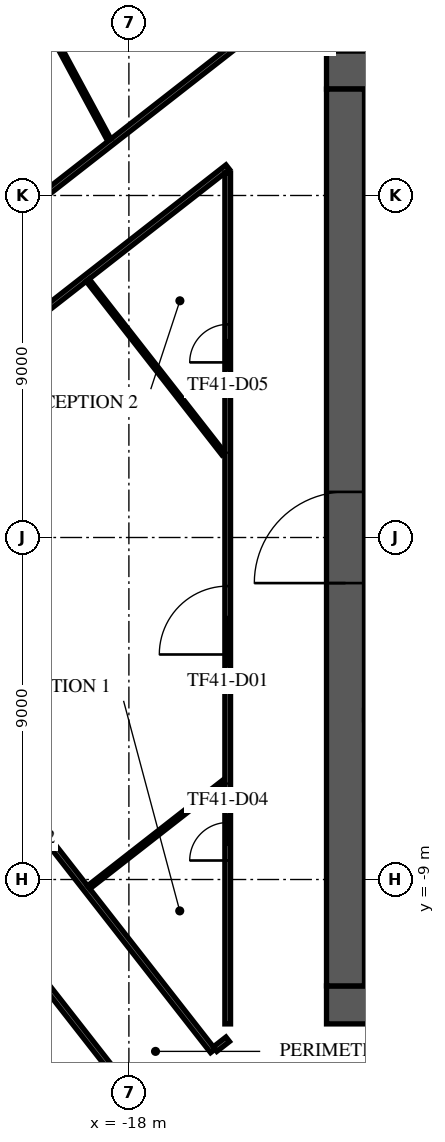
"""IFC4 building model, lengths in metres.
Left out: names, types, materials, properties, quantities, classifications, styles, units other than length and angle.
Written with IfcOpenShell. Run it as: python <this file> out.ifc"""

import sys

from ifc_helpers import new_model, si_unit, direction, frame, frame_2d, origin, place, context, subcontext, project, spatial, rectangle, extrude, element, fill, save


model = new_model("IFC4")
c1 = context("Model", 3, precision=1e-05, world=origin(), true_north=direction((0.0, 1.0)))
c2 = subcontext(c1, "Body", "Model", "MODEL_VIEW")
j1 = project(units=[si_unit("LENGTHUNIT", "METRE"), si_unit("PLANEANGLEUNIT", "RADIAN")], contexts=[c1])
p1 = place(None, origin())
s1 = spatial("IfcSite", under=j1, at=p1, CompositionType="ELEMENT")
p2 = place(p1, origin())
s2 = spatial("IfcBuilding", under=s1, at=p2, CompositionType="ELEMENT")
p3 = place(p2, frame((0.0, 0.0, 175.7)))
s3 = spatial("IfcBuildingStorey", under=s2, at=p3, CompositionType="ELEMENT", Elevation=175.7)
p4 = place(p3, frame((-12.8, 12.3, 0.0), z_axis=(0.0, 0.0, 1.0), x_axis=(1.0, 0.0, 0.0)))
e1 = element("IfcWall", 1, at=p4, inside=s3, PredefinedType="SHEAR", context=c2, shape_type="SweptSolid", body=[
    extrude(rectangle(XDim=25.6, YDim=1.0, at=frame_2d((12.8, 0.0))), origin(), (0.0, 0.0, 1.0), 3.6),
])
p5 = place(p4, frame((11.6, 0.0, 0.0)))
e2 = element("IfcOpeningElement", 2, at=p5, cuts=e1, PredefinedType="OPENING", context=c2, shape_type="SweptSolid", body=[
    extrude(rectangle(XDim=2.4, YDim=2.4, at=frame_2d((1.2, 1.2))), frame((0.0, 0.51, 0.0), z_axis=(0.0, -1.0, 0.0), x_axis=(1.0, 0.0, 0.0)), (0.0, 0.0, 1.0), 1.02),
])
p6 = place(p4, frame((22.425, 0.0, 0.0)))
e3 = element("IfcOpeningElement", 3, at=p6, cuts=e1, PredefinedType="OPENING", context=c2, shape_type="SweptSolid", body=[
    extrude(rectangle(XDim=1.2, YDim=2.1, at=frame_2d((0.6, 1.05))), frame((0.0, 0.51, 0.0), z_axis=(0.0, -1.0, 0.0), x_axis=(1.0, 0.0, 0.0)), (0.0, 0.0, 1.0), 1.02),
])
p7 = place(p4, frame((1.4, 0.0, 0.0)))
e4 = element("IfcOpeningElement", 4, at=p7, cuts=e1, PredefinedType="OPENING", context=c2, shape_type="SweptSolid", body=[
    extrude(rectangle(XDim=1.0, YDim=2.1, at=frame_2d((0.5, 1.05))), frame((0.0, 0.51, 0.0), z_axis=(0.0, -1.0, 0.0), x_axis=(1.0, 0.0, 0.0)), (0.0, 0.0, 1.0), 1.02),
])
p8 = place(p3, frame((-12.8, -12.3, 0.0), z_axis=(0.0, 0.0, 1.0), x_axis=(1.0, 0.0, 0.0)))
e5 = element("IfcWall", 5, at=p8, inside=s3, PredefinedType="SHEAR", context=c2, shape_type="SweptSolid", body=[
    extrude(rectangle(XDim=25.6, YDim=1.0, at=frame_2d((12.8, 0.0))), origin(), (0.0, 0.0, 1.0), 3.6),
])
p9 = place(p8, frame((7.7, 0.0, 0.0)))
e6 = element("IfcOpeningElement", 6, at=p9, cuts=e5, PredefinedType="OPENING", context=c2, shape_type="SweptSolid", body=[
    extrude(rectangle(XDim=2.0, YDim=2.1, at=frame_2d((1.0, 1.05))), frame((0.0, 0.51, 0.0), z_axis=(0.0, -1.0, 0.0), x_axis=(1.0, 0.0, 0.0)), (0.0, 0.0, 1.0), 1.02),
])
p10 = place(p8, frame((17.825, 0.0, 0.0)))
e7 = element("IfcOpeningElement", 7, at=p10, cuts=e5, PredefinedType="OPENING", context=c2, shape_type="SweptSolid", body=[
    extrude(rectangle(XDim=1.2, YDim=2.1, at=frame_2d((0.6, 1.05))), frame((0.0, 0.51, 0.0), z_axis=(0.0, -1.0, 0.0), x_axis=(1.0, 0.0, 0.0)), (0.0, 0.0, 1.0), 1.02),
])
p11 = place(p8, frame((1.975, 0.0, 0.0)))
e8 = element("IfcOpeningElement", 8, at=p11, cuts=e5, PredefinedType="OPENING", context=c2, shape_type="SweptSolid", body=[
    extrude(rectangle(XDim=1.2, YDim=2.1, at=frame_2d((0.6, 1.05))), frame((0.0, 0.51, 0.0), z_axis=(0.0, -1.0, 0.0), x_axis=(1.0, 0.0, 0.0)), (0.0, 0.0, 1.0), 1.02),
])
p12 = place(p8, frame((22.425, 0.0, 0.0)))
e9 = element("IfcOpeningElement", 9, at=p12, cuts=e5, PredefinedType="OPENING", context=c2, shape_type="SweptSolid", body=[
    extrude(rectangle(XDim=1.2, YDim=2.1, at=frame_2d((0.6, 1.05))), frame((0.0, 0.51, 0.0), z_axis=(0.0, -1.0, 0.0), x_axis=(1.0, 0.0, 0.0)), (0.0, 0.0, 1.0), 1.02),
])
p13 = place(p3, frame((-12.3, -11.8, 0.0), z_axis=(0.0, 0.0, 1.0), x_axis=(0.0, 1.0, 0.0)))
e10 = element("IfcWall", 10, at=p13, inside=s3, PredefinedType="SHEAR", context=c2, shape_type="SweptSolid", body=[
    extrude(rectangle(XDim=23.6, YDim=1.0, at=frame_2d((11.8, 0.0))), origin(), (0.0, 0.0, 1.0), 3.6),
])
p14 = place(p13, frame((10.6, 0.0, 0.0)))
e11 = element("IfcOpeningElement", 11, at=p14, cuts=e10, PredefinedType="OPENING", context=c2, shape_type="SweptSolid", body=[
    extrude(rectangle(XDim=2.4, YDim=2.4, at=frame_2d((1.2, 1.2))), frame((0.0, 0.51, 0.0), z_axis=(0.0, -1.0, 0.0), x_axis=(1.0, 0.0, 0.0)), (0.0, 0.0, 1.0), 1.02),
])
p15 = place(p3, frame((-8.65, -4.675, 0.0), z_axis=(0.0, 0.0, 1.0), x_axis=(-1.0, 0.0, 0.0)))
e12 = element("IfcWall", 12, at=p15, inside=s3, PredefinedType="SOLIDWALL", context=c2, shape_type="SweptSolid", body=[
    extrude(rectangle(XDim=3.15, YDim=0.25, at=frame_2d((1.575, 0.0))), origin(), (0.0, 0.0, 1.0), 3.6),
])
p16 = place(p3, frame((3.238, 35.651, 0.0), z_axis=(0.0, 0.0, 1.0), x_axis=(-0.788009530914, -0.615663040298, 0.0)))
e13 = element("IfcWall", 13, at=p16, inside=s3, PredefinedType="STANDARD", context=c2, shape_type="SweptSolid", body=[
    extrude(rectangle(XDim=49.376, YDim=0.6, at=frame_2d((24.688, 0.0))), origin(), (0.0, 0.0, 1.0), 3.6),
])
p17 = place(p16, frame((1.2, 0.0, 0.9)))
e14 = element("IfcOpeningElement", 14, at=p17, cuts=e13, PredefinedType="OPENING", context=c2, shape_type="SweptSolid", body=[
    extrude(rectangle(XDim=2.1, YDim=2.1, at=frame_2d((1.05, 1.05))), frame((0.0, 0.31, 0.0), z_axis=(0.0, -1.0, 0.0), x_axis=(1.0, 0.0, 0.0)), (0.0, 0.0, 1.0), 0.62),
])
p18 = place(p16, frame((5.7, 0.0, 0.9)))
e15 = element("IfcOpeningElement", 15, at=p18, cuts=e13, PredefinedType="OPENING", context=c2, shape_type="SweptSolid", body=[
    extrude(rectangle(XDim=2.1, YDim=2.1, at=frame_2d((1.05, 1.05))), frame((0.0, 0.31, 0.0), z_axis=(0.0, -1.0, 0.0), x_axis=(1.0, 0.0, 0.0)), (0.0, 0.0, 1.0), 0.62),
])
p19 = place(p16, frame((10.2, 0.0, 0.9)))
e16 = element("IfcOpeningElement", 16, at=p19, cuts=e13, PredefinedType="OPENING", context=c2, shape_type="SweptSolid", body=[
    extrude(rectangle(XDim=2.1, YDim=2.1, at=frame_2d((1.05, 1.05))), frame((0.0, 0.31, 0.0), z_axis=(0.0, -1.0, 0.0), x_axis=(1.0, 0.0, 0.0)), (0.0, 0.0, 1.0), 0.62),
])
p20 = place(p16, frame((14.7, 0.0, 0.9)))
e17 = element("IfcOpeningElement", 17, at=p20, cuts=e13, PredefinedType="OPENING", context=c2, shape_type="SweptSolid", body=[
    extrude(rectangle(XDim=2.1, YDim=2.1, at=frame_2d((1.05, 1.05))), frame((0.0, 0.31, 0.0), z_axis=(0.0, -1.0, 0.0), x_axis=(1.0, 0.0, 0.0)), (0.0, 0.0, 1.0), 0.62),
])
p21 = place(p16, frame((19.2, 0.0, 0.9)))
e18 = element("IfcOpeningElement", 18, at=p21, cuts=e13, PredefinedType="OPENING", context=c2, shape_type="SweptSolid", body=[
    extrude(rectangle(XDim=2.1, YDim=2.1, at=frame_2d((1.05, 1.05))), frame((0.0, 0.31, 0.0), z_axis=(0.0, -1.0, 0.0), x_axis=(1.0, 0.0, 0.0)), (0.0, 0.0, 1.0), 0.62),
])
p22 = place(p16, frame((23.7, 0.0, 0.9)))
e19 = element("IfcOpeningElement", 19, at=p22, cuts=e13, PredefinedType="OPENING", context=c2, shape_type="SweptSolid", body=[
    extrude(rectangle(XDim=2.1, YDim=2.1, at=frame_2d((1.05, 1.05))), frame((0.0, 0.31, 0.0), z_axis=(0.0, -1.0, 0.0), x_axis=(1.0, 0.0, 0.0)), (0.0, 0.0, 1.0), 0.62),
])
p23 = place(p16, frame((28.2, 0.0, 0.9)))
e20 = element("IfcOpeningElement", 20, at=p23, cuts=e13, PredefinedType="OPENING", context=c2, shape_type="SweptSolid", body=[
    extrude(rectangle(XDim=2.1, YDim=2.1, at=frame_2d((1.05, 1.05))), frame((0.0, 0.31, 0.0), z_axis=(0.0, -1.0, 0.0), x_axis=(1.0, 0.0, 0.0)), (0.0, 0.0, 1.0), 0.62),
])
p24 = place(p16, frame((32.7, 0.0, 0.9)))
e21 = element("IfcOpeningElement", 21, at=p24, cuts=e13, PredefinedType="OPENING", context=c2, shape_type="SweptSolid", body=[
    extrude(rectangle(XDim=2.1, YDim=2.1, at=frame_2d((1.05, 1.05))), frame((0.0, 0.31, 0.0), z_axis=(0.0, -1.0, 0.0), x_axis=(1.0, 0.0, 0.0)), (0.0, 0.0, 1.0), 0.62),
])
p25 = place(p16, frame((37.2, 0.0, 0.9)))
e22 = element("IfcOpeningElement", 22, at=p25, cuts=e13, PredefinedType="OPENING", context=c2, shape_type="SweptSolid", body=[
    extrude(rectangle(XDim=2.1, YDim=2.1, at=frame_2d((1.05, 1.05))), frame((0.0, 0.31, 0.0), z_axis=(0.0, -1.0, 0.0), x_axis=(1.0, 0.0, 0.0)), (0.0, 0.0, 1.0), 0.62),
])
p26 = place(p16, frame((41.7, 0.0, 0.9)))
e23 = element("IfcOpeningElement", 23, at=p26, cuts=e13, PredefinedType="OPENING", context=c2, shape_type="SweptSolid", body=[
    extrude(rectangle(XDim=2.1, YDim=2.1, at=frame_2d((1.05, 1.05))), frame((0.0, 0.31, 0.0), z_axis=(0.0, -1.0, 0.0), x_axis=(1.0, 0.0, 0.0)), (0.0, 0.0, 1.0), 0.62),
])
p27 = place(p16, frame((46.138, 0.0, 0.9)))
e24 = element("IfcOpeningElement", 24, at=p27, cuts=e13, PredefinedType="OPENING", context=c2, shape_type="SweptSolid", body=[
    extrude(rectangle(XDim=2.1, YDim=2.1, at=frame_2d((1.05, 1.05))), frame((0.0, 0.31, 0.0), z_axis=(0.0, -1.0, 0.0), x_axis=(1.0, 0.0, 0.0)), (0.0, 0.0, 1.0), 0.62),
])
p28 = place(p3, frame((-36.503, -1.52, 0.0), z_axis=(0.0, 0.0, 1.0), x_axis=(0.615658293455, -0.788013239546, 0.0)))
e25 = element("IfcWall", 25, at=p28, inside=s3, PredefinedType="STANDARD", context=c2, shape_type="SweptSolid", body=[
    extrude(rectangle(XDim=42.552, YDim=0.6, at=frame_2d((21.276, 0.0))), origin(), (0.0, 0.0, 1.0), 3.6),
])
p29 = place(p28, frame((1.178, 0.0, 0.9)))
e26 = element("IfcOpeningElement", 26, at=p29, cuts=e25, PredefinedType="OPENING", context=c2, shape_type="SweptSolid", body=[
    extrude(rectangle(XDim=1.8, YDim=2.1, at=frame_2d((0.9, 1.05))), frame((0.0, 0.31, 0.0), z_axis=(0.0, -1.0, 0.0), x_axis=(1.0, 0.0, 0.0)), (0.0, 0.0, 1.0), 0.62),
])
p30 = place(p28, frame((5.396, 0.0, 0.9)))
e27 = element("IfcOpeningElement", 27, at=p30, cuts=e25, PredefinedType="OPENING", context=c2, shape_type="SweptSolid", body=[
    extrude(rectangle(XDim=1.8, YDim=2.1, at=frame_2d((0.9, 1.05))), frame((0.0, 0.31, 0.0), z_axis=(0.0, -1.0, 0.0), x_axis=(1.0, 0.0, 0.0)), (0.0, 0.0, 1.0), 0.62),
])
p31 = place(p28, frame((9.676, 0.0, 0.9)))
e28 = element("IfcOpeningElement", 28, at=p31, cuts=e25, PredefinedType="OPENING", context=c2, shape_type="SweptSolid", body=[
    extrude(rectangle(XDim=1.8, YDim=2.1, at=frame_2d((0.9, 1.05))), frame((0.0, 0.31, 0.0), z_axis=(0.0, -1.0, 0.0), x_axis=(1.0, 0.0, 0.0)), (0.0, 0.0, 1.0), 0.62),
])
p32 = place(p28, frame((13.956, 0.0, 0.9)))
e29 = element("IfcOpeningElement", 29, at=p32, cuts=e25, PredefinedType="OPENING", context=c2, shape_type="SweptSolid", body=[
    extrude(rectangle(XDim=1.8, YDim=2.1, at=frame_2d((0.9, 1.05))), frame((0.0, 0.31, 0.0), z_axis=(0.0, -1.0, 0.0), x_axis=(1.0, 0.0, 0.0)), (0.0, 0.0, 1.0), 0.62),
])
p33 = place(p28, frame((18.236, 0.0, 0.9)))
e30 = element("IfcOpeningElement", 30, at=p33, cuts=e25, PredefinedType="OPENING", context=c2, shape_type="SweptSolid", body=[
    extrude(rectangle(XDim=1.8, YDim=2.1, at=frame_2d((0.9, 1.05))), frame((0.0, 0.31, 0.0), z_axis=(0.0, -1.0, 0.0), x_axis=(1.0, 0.0, 0.0)), (0.0, 0.0, 1.0), 0.62),
])
p34 = place(p28, frame((22.516, 0.0, 0.9)))
e31 = element("IfcOpeningElement", 31, at=p34, cuts=e25, PredefinedType="OPENING", context=c2, shape_type="SweptSolid", body=[
    extrude(rectangle(XDim=1.8, YDim=2.1, at=frame_2d((0.9, 1.05))), frame((0.0, 0.31, 0.0), z_axis=(0.0, -1.0, 0.0), x_axis=(1.0, 0.0, 0.0)), (0.0, 0.0, 1.0), 0.62),
])
p35 = place(p28, frame((26.796, 0.0, 0.9)))
e32 = element("IfcOpeningElement", 32, at=p35, cuts=e25, PredefinedType="OPENING", context=c2, shape_type="SweptSolid", body=[
    extrude(rectangle(XDim=1.8, YDim=2.1, at=frame_2d((0.9, 1.05))), frame((0.0, 0.31, 0.0), z_axis=(0.0, -1.0, 0.0), x_axis=(1.0, 0.0, 0.0)), (0.0, 0.0, 1.0), 0.62),
])
p36 = place(p28, frame((35.356, 0.0, 0.9)))
e33 = element("IfcOpeningElement", 33, at=p36, cuts=e25, PredefinedType="OPENING", context=c2, shape_type="SweptSolid", body=[
    extrude(rectangle(XDim=1.8, YDim=2.1, at=frame_2d((0.9, 1.05))), frame((0.0, 0.31, 0.0), z_axis=(0.0, -1.0, 0.0), x_axis=(1.0, 0.0, 0.0)), (0.0, 0.0, 1.0), 0.62),
])
p37 = place(p28, frame((39.573, 0.0, 0.9)))
e34 = element("IfcOpeningElement", 34, at=p37, cuts=e25, PredefinedType="OPENING", context=c2, shape_type="SweptSolid", body=[
    extrude(rectangle(XDim=1.8, YDim=2.1, at=frame_2d((0.9, 1.05))), frame((0.0, 0.31, 0.0), z_axis=(0.0, -1.0, 0.0), x_axis=(1.0, 0.0, 0.0)), (0.0, 0.0, 1.0), 0.62),
])
p38 = place(p3, frame((-26.789, -3.331, 0.0), z_axis=(0.0, 0.0, 1.0), x_axis=(0.615659714696, -0.788012129158, 0.0)))
e35 = element("IfcWall", 35, at=p38, inside=s3, PredefinedType="PARTITIONING", context=c2, shape_type="SweptSolid", body=[
    extrude(rectangle(XDim=27.811, YDim=0.15, at=frame_2d((13.905, 0.0))), origin(), (0.0, 0.0, 1.0), 3.15),
])
p39 = place(p38, frame((15.872, 0.0, 0.0)))
e36 = element("IfcOpeningElement", 36, at=p39, cuts=e35, PredefinedType="OPENING", context=c2, shape_type="SweptSolid", body=[
    extrude(rectangle(XDim=1.0, YDim=2.1, at=frame_2d((0.5, 1.05))), frame((0.0, 0.085, 0.0), z_axis=(0.0, -1.0, 0.0), x_axis=(1.0, 0.0, 0.0)), (0.0, 0.0, 1.0), 0.17),
])
p40 = place(p3, frame((-24.898, -1.854, 0.0), z_axis=(0.0, 0.0, 1.0), x_axis=(0.615662298675, -0.788010110335, 0.0)))
e37 = element("IfcWall", 37, at=p40, inside=s3, PredefinedType="PARTITIONING", context=c2, shape_type="SweptSolid", body=[
    extrude(rectangle(XDim=14.792, YDim=0.15, at=frame_2d((7.396, 0.0))), origin(), (0.0, 0.0, 1.0), 3.15),
])
p41 = place(p40, frame((5.8, 0.0, 0.0)))
e38 = element("IfcOpeningElement", 38, at=p41, cuts=e37, PredefinedType="OPENING", context=c2, shape_type="SweptSolid", body=[
    extrude(rectangle(XDim=1.0, YDim=2.1, at=frame_2d((0.5, 1.05))), frame((0.0, 0.085, 0.0), z_axis=(0.0, -1.0, 0.0), x_axis=(1.0, 0.0, 0.0)), (0.0, 0.0, 1.0), 0.17),
])
p42 = place(p3, frame((-24.433, 5.734, 0.0), z_axis=(0.0, 0.0, 1.0), x_axis=(0.788010131951, 0.615662271008, 0.0)))
e39 = element("IfcWall", 39, at=p42, inside=s3, PredefinedType="PARTITIONING", context=c2, shape_type="SweptSolid", body=[
    extrude(rectangle(XDim=31.448, YDim=0.15, at=frame_2d((15.724, 0.0))), origin(), (0.0, 0.0, 1.0), 3.15),
])
p43 = place(p42, frame((13.108, 0.0, 0.0)))
e40 = element("IfcOpeningElement", 40, at=p43, cuts=e39, PredefinedType="OPENING", context=c2, shape_type="SweptSolid", body=[
    extrude(rectangle(XDim=1.0, YDim=2.1, at=frame_2d((0.5, 1.05))), frame((0.0, 0.085, 0.0), z_axis=(0.0, -1.0, 0.0), x_axis=(1.0, 0.0, 0.0)), (0.0, 0.0, 1.0), 0.17),
])
p44 = place(p42, frame((23.227, 0.0, 0.0)))
e41 = element("IfcOpeningElement", 41, at=p44, cuts=e39, PredefinedType="OPENING", context=c2, shape_type="SweptSolid", body=[
    extrude(rectangle(XDim=1.0, YDim=2.1, at=frame_2d((0.5, 1.05))), frame((0.0, 0.085, 0.0), z_axis=(0.0, -1.0, 0.0), x_axis=(1.0, 0.0, 0.0)), (0.0, 0.0, 1.0), 0.17),
])
p45 = place(p3, frame((-22.897, 3.888, 0.0), z_axis=(0.0, 0.0, 1.0), x_axis=(0.787982356531, 0.615697820197, 0.0)))
e42 = element("IfcWall", 42, at=p45, inside=s3, PredefinedType="PARTITIONING", context=c2, shape_type="SweptSolid", body=[
    extrude(rectangle(XDim=9.514, YDim=0.15, at=frame_2d((4.757, 0.0))), origin(), (0.0, 0.0, 1.0), 3.15),
])
p46 = place(p3, frame((-15.732, -13.464, 0.0), z_axis=(0.0, 0.0, 1.0), x_axis=(0.788507933506, 0.615024583897, 0.0)))
e43 = element("IfcWall", 43, at=p46, inside=s3, PredefinedType="PARTITIONING", context=c2, shape_type="SweptSolid", body=[
    extrude(rectangle(XDim=0.421, YDim=0.15, at=frame_2d((0.21, 0.0))), origin(), (0.0, 0.0, 1.0), 3.15),
])
p47 = place(p3, frame((-15.4, -12.8, 0.0), z_axis=(0.0, 0.0, 1.0), x_axis=(0.0, 1.0, 0.0)))
e44 = element("IfcWall", 44, at=p47, inside=s3, PredefinedType="PARTITIONING", context=c2, shape_type="SweptSolid", body=[
    extrude(rectangle(XDim=22.392, YDim=0.15, at=frame_2d((11.196, 0.0))), origin(), (0.0, 0.0, 1.0), 3.15),
])
p48 = place(p47, frame((9.721, 0.0, 0.0)))
e45 = element("IfcOpeningElement", 45, at=p48, cuts=e44, PredefinedType="OPENING", context=c2, shape_type="SweptSolid", body=[
    extrude(rectangle(XDim=1.8, YDim=2.1, at=frame_2d((0.9, 1.05))), frame((0.0, 0.085, 0.0), z_axis=(0.0, -1.0, 0.0), x_axis=(1.0, 0.0, 0.0)), (0.0, 0.0, 1.0), 0.17),
])
p49 = place(p47, frame((4.3, 0.0, 0.0)))
e46 = element("IfcOpeningElement", 46, at=p49, cuts=e44, PredefinedType="OPENING", context=c2, shape_type="SweptSolid", body=[
    extrude(rectangle(XDim=1.0, YDim=2.1, at=frame_2d((0.5, 1.05))), frame((0.0, 0.085, 0.0), z_axis=(0.0, -1.0, 0.0), x_axis=(1.0, 0.0, 0.0)), (0.0, 0.0, 1.0), 0.17),
])
p50 = place(p47, frame((17.408, 0.0, 0.0)))
e47 = element("IfcOpeningElement", 47, at=p50, cuts=e44, PredefinedType="OPENING", context=c2, shape_type="SweptSolid", body=[
    extrude(rectangle(XDim=1.0, YDim=2.1, at=frame_2d((0.5, 1.05))), frame((0.0, 0.085, 0.0), z_axis=(0.0, -1.0, 0.0), x_axis=(1.0, 0.0, 0.0)), (0.0, 0.0, 1.0), 0.17),
])
p51 = place(p3, frame((-21.478, 15.958, 0.0), z_axis=(0.0, 0.0, 1.0), x_axis=(0.474316685511, -0.880354293365, 0.0)))
e48 = element("IfcWall", 48, at=p51, inside=s3, PredefinedType="PARTITIONING", context=c2, shape_type="SweptSolid", body=[
    extrude(rectangle(XDim=6.243, YDim=0.1, at=frame_2d((3.122, 0.0))), origin(), (0.0, 0.0, 1.0), 2.9),
])
p52 = place(p3, frame((-19.084, 6.773, 0.0), z_axis=(0.0, 0.0, 1.0), x_axis=(0.61565629967, -0.788014797245, 0.0)))
e49 = element("IfcWall", 49, at=p52, inside=s3, PredefinedType="PARTITIONING", context=c2, shape_type="SweptSolid", body=[
    extrude(rectangle(XDim=5.798, YDim=0.1, at=frame_2d((2.899, 0.0))), origin(), (0.0, 0.0, 1.0), 3.15),
])
p53 = place(p3, frame((-19.059, -9.206, 0.0), z_axis=(0.0, 0.0, 1.0), x_axis=(0.787985790325, 0.615693425534, 0.0)))
e50 = element("IfcWall", 50, at=p53, inside=s3, PredefinedType="PARTITIONING", context=c2, shape_type="SweptSolid", body=[
    extrude(rectangle(XDim=4.509, YDim=0.1, at=frame_2d((2.254, 0.0))), origin(), (0.0, 0.0, 1.0), 3.6),
])
p54 = place(p14, origin())
e51 = element("IfcDoor", 51, at=p54, inside=s3, OperationType="SINGLE_SWING_LEFT", PredefinedType="DOOR", context=c2, shape_type="SweptSolid", body=[
    extrude(rectangle(XDim=2.4, YDim=2.4, at=frame_2d((1.2, 1.2))), frame((0.0, 0.025, 0.0), z_axis=(0.0, -1.0, 0.0), x_axis=(1.0, 0.0, 0.0)), (0.0, 0.0, 1.0), 0.05),
])
fill(e11, e51)
p55 = place(p48, origin())
e52 = element("IfcDoor", 52, at=p55, inside=s3, OperationType="DOUBLE_DOOR_SINGLE_SWING", PredefinedType="DOOR", context=c2, shape_type="SweptSolid", body=[
    extrude(rectangle(XDim=1.8, YDim=2.1, at=frame_2d((0.9, 1.05))), frame((0.0, 0.025, 0.0), z_axis=(0.0, -1.0, 0.0), x_axis=(1.0, 0.0, 0.0)), (0.0, 0.0, 1.0), 0.05),
])
fill(e45, e52)
p56 = place(p49, origin())
e53 = element("IfcDoor", 53, at=p56, inside=s3, OperationType="SINGLE_SWING_RIGHT", PredefinedType="DOOR", context=c2, shape_type="SweptSolid", body=[
    extrude(rectangle(XDim=1.0, YDim=2.1, at=frame_2d((0.5, 1.05))), frame((0.0, 0.025, 0.0), z_axis=(0.0, -1.0, 0.0), x_axis=(1.0, 0.0, 0.0)), (0.0, 0.0, 1.0), 0.05),
])
fill(e46, e53)
p57 = place(p50, origin())
e54 = element("IfcDoor", 54, at=p57, inside=s3, OperationType="SINGLE_SWING_LEFT", PredefinedType="DOOR", context=c2, shape_type="SweptSolid", body=[
    extrude(rectangle(XDim=1.0, YDim=2.1, at=frame_2d((0.5, 1.05))), frame((0.0, 0.025, 0.0), z_axis=(0.0, -1.0, 0.0), x_axis=(1.0, 0.0, 0.0)), (0.0, 0.0, 1.0), 0.05),
])
fill(e47, e54)
save(model, sys.argv[1])
